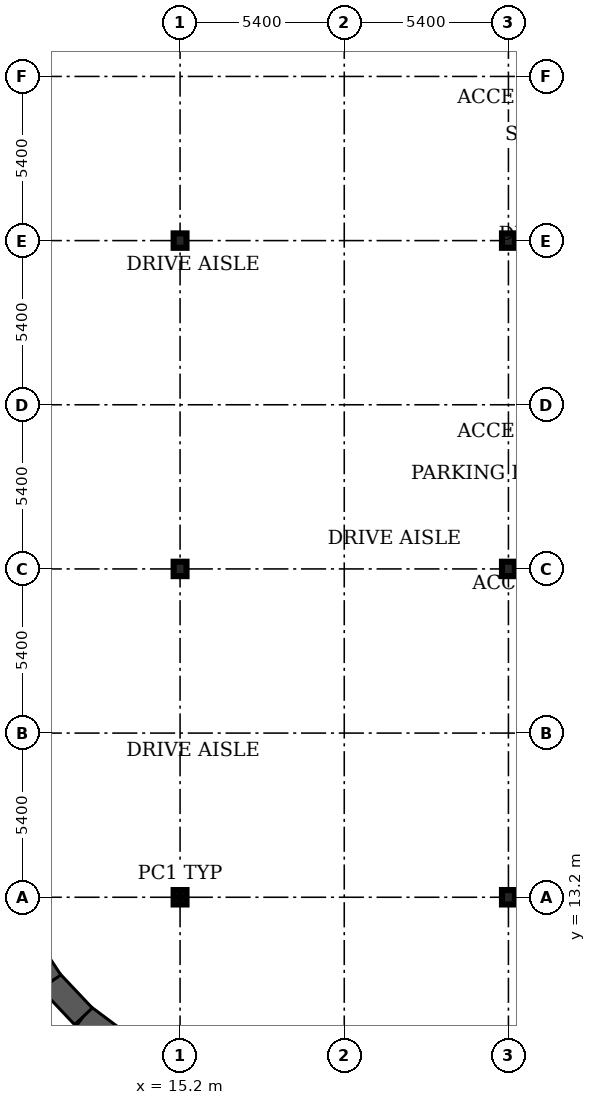
"""IFC4 building model, lengths in metres.
Left out: names, types, materials, properties, quantities, classifications, styles, units other than length and angle.
Written with IfcOpenShell. Run it as: python <this file> out.ifc"""

import sys

from ifc_helpers import new_model, si_unit, direction, frame, frame_2d, origin, origin_2d, place, context, subcontext, project, spatial, rectangle, i_section, extrude, element, save


model = new_model("IFC4")
c1 = context("Model", 3, precision=1e-05, world=origin(), true_north=direction((0.0, 1.0)))
c2 = subcontext(c1, "Body", "Model", "MODEL_VIEW")
j1 = project(units=[si_unit("LENGTHUNIT", "METRE"), si_unit("PLANEANGLEUNIT", "RADIAN")], contexts=[c1])
p1 = place(None, origin())
s1 = spatial("IfcSite", under=j1, at=p1, CompositionType="ELEMENT")
p2 = place(p1, origin())
s2 = spatial("IfcBuilding", under=s1, at=p2, CompositionType="ELEMENT")
p3 = place(p2, frame((0.0, 0.0, -5.0)))
s3 = spatial("IfcBuildingStorey", under=s2, at=p3, CompositionType="ELEMENT", Elevation=-5.0)
for number, where, z_axis, x_axis in (
    (1, (15.2, 13.2, 0.0), (0.0, 0.0, 1.0), (1.0, 0.0, 0.0)),
    (2, (26.0, 13.2, 0.0), (0.0, 0.0, 1.0), (1.0, 0.0, 0.0)),
    (3, (15.2, 24.0, 0.0), (0.0, 0.0, 1.0), (1.0, 0.0, 0.0)),
    (4, (26.0, 24.0, 0.0), (0.0, 0.0, 1.0), (1.0, 0.0, 0.0)),
    (5, (15.2, 34.8, 0.0), (0.0, 0.0, 1.0), (1.0, 0.0, 0.0)),
    (6, (26.0, 34.8, 0.0), (0.0, 0.0, 1.0), (1.0, 0.0, 0.0)),
):
    element("IfcColumn", number, at=place(p3, frame(where, z_axis=z_axis, x_axis=x_axis)), inside=s3, PredefinedType="COLUMN", context=c2, shape_type="SweptSolid", body=[
        extrude(i_section(OverallWidth=0.424, OverallDepth=0.474, WebThickness=0.048, FlangeThickness=0.077, FilletRadius=0.014, at=origin_2d()), origin(), (0.0, 0.0, 1.0), 5.0),
    ])
p4 = place(p3, frame((13.279, 8.346, 0.0), z_axis=(0.0, 0.0, 1.0), x_axis=(-0.801771638905, 0.597630520512, 0.0)))
e7 = element("IfcWall", 7, at=p4, inside=s3, PredefinedType="SOLIDWALL", context=c2, shape_type="SweptSolid", body=[
    extrude(rectangle(XDim=1.568, YDim=0.8, at=frame_2d((0.784, 0.0))), origin(), (0.0, 0.0, 1.0), 5.0),
])
p5 = place(p3, frame((12.022, 9.283, 0.0), z_axis=(0.0, 0.0, 1.0), x_axis=(-0.686641833089, 0.726995868662, 0.0)))
e8 = element("IfcWall", 8, at=p5, inside=s3, PredefinedType="SOLIDWALL", context=c2, shape_type="SweptSolid", body=[
    extrude(rectangle(XDim=1.567, YDim=0.8, at=frame_2d((0.783, 0.0))), origin(), (0.0, 0.0, 1.0), 5.0),
])
p6 = place(p3, frame((10.946, 10.422, 0.0), z_axis=(0.0, 0.0, 1.0), x_axis=(-0.549333272834, 0.835603348101, 0.0)))
e9 = element("IfcWall", 9, at=p6, inside=s3, PredefinedType="SOLIDWALL", context=c2, shape_type="SweptSolid", body=[
    extrude(rectangle(XDim=1.568, YDim=0.8, at=frame_2d((0.784, 0.0))), origin(), (0.0, 0.0, 1.0), 5.0),
])
save(model, sys.argv[1])
